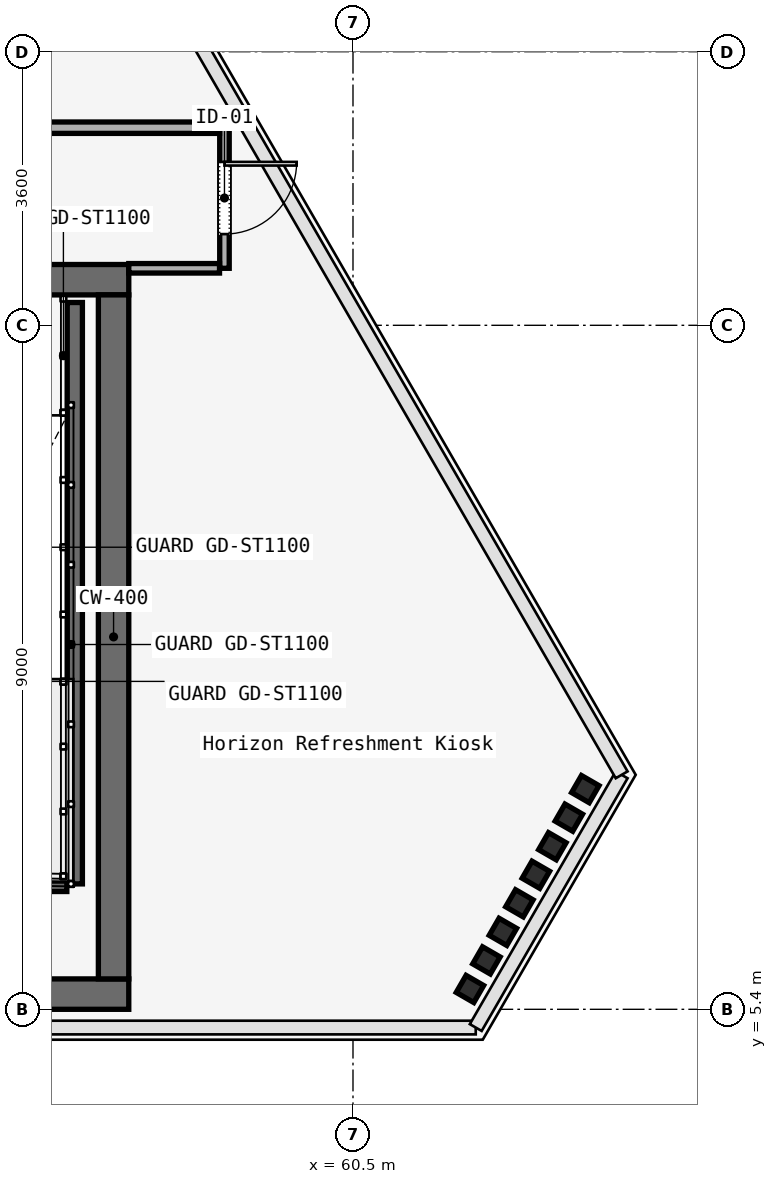
"""IFC4 building model, lengths in metres.
Left out: names, types, materials, properties, quantities, classifications, styles, units other than length and angle.
Written with IfcOpenShell. Run it as: python <this file> out.ifc"""

import sys

from ifc_helpers import new_model, si_unit, direction, frame, frame_2d, origin, origin_2d, place, context, subcontext, project, spatial, rectangle, i_section, extrude, element, fill, save


model = new_model("IFC4")
c1 = context("Model", 3, precision=1e-05, world=origin(), true_north=direction((0.0, 1.0)))
c2 = subcontext(c1, "Body", "Model", "MODEL_VIEW")
j1 = project(units=[si_unit("LENGTHUNIT", "METRE"), si_unit("PLANEANGLEUNIT", "RADIAN")], contexts=[c1])
p1 = place(None, origin())
s1 = spatial("IfcSite", under=j1, at=p1, CompositionType="ELEMENT")
p2 = place(p1, origin())
s2 = spatial("IfcBuilding", under=s1, at=p2, CompositionType="ELEMENT")
p3 = place(p2, frame((0.0, 0.0, 303.3)))
s3 = spatial("IfcBuildingStorey", under=s2, at=p3, CompositionType="ELEMENT", Elevation=303.3)
p4 = place(p3, frame((26.45, 15.0, 0.0), z_axis=(0.0, 0.0, 1.0), x_axis=(1.0, 0.0, 0.0)))
e1 = element("IfcWall", 1, at=p4, inside=s3, PredefinedType="SOLIDWALL", context=c2, shape_type="SweptSolid", body=[
    extrude(rectangle(XDim=31.1, YDim=0.4, at=frame_2d((15.55, 0.0))), origin(), (0.0, 0.0, 1.0), 4.4),
])
p5 = place(p4, frame((1.65, 0.0, 0.0)))
e2 = element("IfcOpeningElement", 2, at=p5, cuts=e1, PredefinedType="OPENING", context=c2, shape_type="SweptSolid", body=[
    extrude(rectangle(XDim=1.1, YDim=2.2, at=frame_2d((0.55, 1.1))), frame((0.0, 0.2, 0.0), z_axis=(0.0, -1.0, 0.0), x_axis=(1.0, 0.0, 0.0)), (0.0, 0.0, 1.0), 0.4),
])
p6 = place(p4, frame((13.65, 0.0, 0.0)))
e3 = element("IfcOpeningElement", 3, at=p6, cuts=e1, PredefinedType="OPENING", context=c2, shape_type="SweptSolid", body=[
    extrude(rectangle(XDim=1.1, YDim=2.2, at=frame_2d((0.55, 1.1))), frame((0.0, 0.2, 0.0), z_axis=(0.0, -1.0, 0.0), x_axis=(1.0, 0.0, 0.0)), (0.0, 0.0, 1.0), 0.4),
])
p7 = place(p4, frame((25.55, 0.0, 0.0)))
e4 = element("IfcOpeningElement", 4, at=p7, cuts=e1, PredefinedType="OPENING", context=c2, shape_type="SweptSolid", body=[
    extrude(rectangle(XDim=1.1, YDim=2.2, at=frame_2d((0.55, 1.1))), frame((0.0, 0.2, 0.0), z_axis=(0.0, -1.0, 0.0), x_axis=(1.0, 0.0, 0.0)), (0.0, 0.0, 1.0), 0.4),
])
p8 = place(p4, frame((19.35, 0.0, 0.0)))
e5 = element("IfcOpeningElement", 5, at=p8, cuts=e1, PredefinedType="OPENING", context=c2, shape_type="SweptSolid", body=[
    extrude(rectangle(XDim=1.1, YDim=2.2, at=frame_2d((0.55, 1.1))), frame((0.0, 0.2, 0.0), z_axis=(0.0, -1.0, 0.0), x_axis=(1.0, 0.0, 0.0)), (0.0, 0.0, 1.0), 0.4),
])
p9 = place(p4, frame((21.4, 0.0, 0.0)))
e6 = element("IfcOpeningElement", 6, at=p9, cuts=e1, PredefinedType="OPENING", context=c2, shape_type="SweptSolid", body=[
    extrude(rectangle(XDim=0.9, YDim=2.1, at=frame_2d((0.45, 1.05))), frame((0.0, 0.2, 0.0), z_axis=(0.0, -1.0, 0.0), x_axis=(1.0, 0.0, 0.0)), (0.0, 0.0, 1.0), 0.4),
])
p10 = place(p4, frame((6.04, 0.0, 0.0)))
e7 = element("IfcOpeningElement", 7, at=p10, cuts=e1, PredefinedType="OPENING", context=c2, shape_type="SweptSolid", body=[
    extrude(rectangle(XDim=0.95, YDim=2.2, at=frame_2d((0.475, 1.1))), frame((0.0, 0.2, 0.0), z_axis=(0.0, -1.0, 0.0), x_axis=(1.0, 0.0, 0.0)), (0.0, 0.0, 1.0), 0.4),
])
p11 = place(p4, frame((9.99, 0.0, 0.0)))
e8 = element("IfcOpeningElement", 8, at=p11, cuts=e1, PredefinedType="OPENING", context=c2, shape_type="SweptSolid", body=[
    extrude(rectangle(XDim=0.95, YDim=2.2, at=frame_2d((0.475, 1.1))), frame((0.0, 0.2, 0.0), z_axis=(0.0, -1.0, 0.0), x_axis=(1.0, 0.0, 0.0)), (0.0, 0.0, 1.0), 0.4),
])
p12 = place(p4, frame((23.35, 0.0, 0.0)))
e9 = element("IfcOpeningElement", 9, at=p12, cuts=e1, PredefinedType="OPENING", context=c2, shape_type="SweptSolid", body=[
    extrude(rectangle(XDim=1.3, YDim=2.3, at=frame_2d((0.65, 1.15))), frame((0.0, 0.2, 0.0), z_axis=(0.0, -1.0, 0.0), x_axis=(1.0, 0.0, 0.0)), (0.0, 0.0, 1.0), 0.4),
])
p13 = place(p3, frame((26.45, 5.6, 0.0), z_axis=(0.0, 0.0, 1.0), x_axis=(1.0, 0.0, 0.0)))
e10 = element("IfcWall", 10, at=p13, inside=s3, PredefinedType="SOLIDWALL", context=c2, shape_type="SweptSolid", body=[
    extrude(rectangle(XDim=31.1, YDim=0.4, at=frame_2d((15.55, 0.0))), origin(), (0.0, 0.0, 1.0), 4.4),
])
p14 = place(p3, frame((57.35, 5.8, 0.0), z_axis=(0.0, 0.0, 1.0), x_axis=(0.0, 1.0, 0.0)))
e11 = element("IfcWall", 11, at=p14, inside=s3, PredefinedType="SOLIDWALL", context=c2, shape_type="SweptSolid", body=[
    extrude(rectangle(XDim=9.0, YDim=0.4, at=frame_2d((4.5, 0.0))), origin(), (0.0, 0.0, 1.0), 4.4),
])
for number, where, z_axis, x_axis in (
    (12, (62.039, 5.668, 0.0), (0.0, 0.0, 1.0), (0.5, 0.866, 0.0)),
    (13, (62.256, 6.043, 0.0), (0.0, 0.0, 1.0), (0.5, 0.866, 0.0)),
    (14, (62.472, 6.419, 0.0), (0.0, 0.0, 1.0), (0.5, 0.866, 0.0)),
    (15, (62.689, 6.795, 0.0), (0.0, 0.0, 1.0), (0.5, 0.866, 0.0)),
    (16, (62.906, 7.17, 0.0), (0.0, 0.0, 1.0), (0.5, 0.866, 0.0)),
    (17, (63.123, 7.546, 0.0), (0.0, 0.0, 1.0), (0.5, 0.866, 0.0)),
    (18, (63.34, 7.922, 0.0), (0.0, 0.0, 1.0), (0.5, 0.866, 0.0)),
    (19, (63.557, 8.297, 0.0), (0.0, 0.0, 1.0), (0.5, 0.866, 0.0)),
):
    element("IfcColumn", number, at=place(p3, frame(where, z_axis=z_axis, x_axis=x_axis)), inside=s3, PredefinedType="COLUMN", context=c2, shape_type="SweptSolid", body=[
        extrude(i_section(OverallWidth=0.259, OverallDepth=0.267, WebThickness=0.013, FlangeThickness=0.021, FilletRadius=0.013, at=origin_2d()), origin(), (0.0, 0.0, 1.0), 4.4),
    ])
p15 = place(p3, frame((56.84, 14.7, 0.0), z_axis=(0.0, 0.0, 1.0), x_axis=(0.0, -1.0, 0.0)))
e20 = element("IfcWall", 20, at=p15, inside=s3, PredefinedType="SOLIDWALL", context=c2, shape_type="SweptSolid", body=[
    extrude(rectangle(XDim=7.65, YDim=0.2, at=frame_2d((3.825, 0.0))), origin(), (0.0, 0.0, 1.0), 4.8),
])
p16 = place(p3, frame((53.62, 7.05, 0.0), z_axis=(0.0, 0.0, 1.0), x_axis=(1.0, 0.0, 0.0)))
e21 = element("IfcWall", 21, at=p16, inside=s3, PredefinedType="SOLIDWALL", context=c2, shape_type="SweptSolid", body=[
    extrude(rectangle(XDim=3.115, YDim=0.2, at=frame_2d((1.558, 0.0))), origin(), (0.0, 0.0, 1.0), 4.8),
])
p17 = place(p3, frame((58.809, 17.0, 0.0), z_axis=(0.0, 0.0, 1.0), x_axis=(0.0, -1.0, 0.0)))
e22 = element("IfcWall", 22, at=p17, inside=s3, PredefinedType="PARTITIONING", context=c2, shape_type="SweptSolid", body=[
    extrude(rectangle(XDim=1.85, YDim=0.125, at=frame_2d((0.925, 0.0))), origin(), (0.0, 0.0, 1.0), 4.36),
])
p18 = place(p17, frame((0.45, 0.0, 0.0)))
e23 = element("IfcOpeningElement", 23, at=p18, cuts=e22, PredefinedType="OPENING", context=c2, shape_type="SweptSolid", body=[
    extrude(rectangle(XDim=0.95, YDim=2.2, at=frame_2d((0.475, 1.1))), frame((0.0, 0.062, 0.0), z_axis=(0.0, -1.0, 0.0), x_axis=(1.0, 0.0, 0.0)), (0.0, 0.0, 1.0), 0.125),
])
p19 = place(p3, frame((58.744, 15.15, 0.0), z_axis=(0.0, 0.0, 1.0), x_axis=(-1.0, 0.0, 0.0)))
e24 = element("IfcWall", 24, at=p19, inside=s3, PredefinedType="PARTITIONING", context=c2, shape_type="SweptSolid", body=[
    extrude(rectangle(XDim=1.194, YDim=0.125, at=frame_2d((0.597, 0.0))), origin(), (0.0, 0.0, 1.0), 4.36),
])
p20 = place(p3, frame((53.4, 17.0, 0.0), z_axis=(0.0, 0.0, 1.0), x_axis=(1.0, 0.0, 0.0)))
e25 = element("IfcWall", 25, at=p20, inside=s3, PredefinedType="PARTITIONING", context=c2, shape_type="SweptSolid", body=[
    extrude(rectangle(XDim=5.344, YDim=0.15, at=frame_2d((2.672, 0.0))), origin(), (0.0, 0.0, 1.0), 4.36),
])
p21 = place(p20, frame((2.222, 0.0, 0.0)))
e26 = element("IfcOpeningElement", 26, at=p21, cuts=e25, PredefinedType="OPENING", context=c2, shape_type="SweptSolid", body=[
    extrude(rectangle(XDim=0.9, YDim=2.15, at=frame_2d((0.45, 1.075))), frame((0.0, 0.075, 0.0), z_axis=(0.0, -1.0, 0.0), x_axis=(1.0, 0.0, 0.0)), (0.0, 0.0, 1.0), 0.15),
])
p22 = place(p18, origin())
e27 = element("IfcDoor", 27, at=p22, inside=s3, OperationType="SINGLE_SWING_RIGHT", PredefinedType="DOOR", context=c2, shape_type="SweptSolid", body=[
    extrude(rectangle(XDim=0.95, YDim=2.2, at=frame_2d((0.475, 1.1))), frame((0.0, 0.025, 0.0), z_axis=(0.0, -1.0, 0.0), x_axis=(1.0, 0.0, 0.0)), (0.0, 0.0, 1.0), 0.05),
])
fill(e23, e27)
save(model, sys.argv[1])
